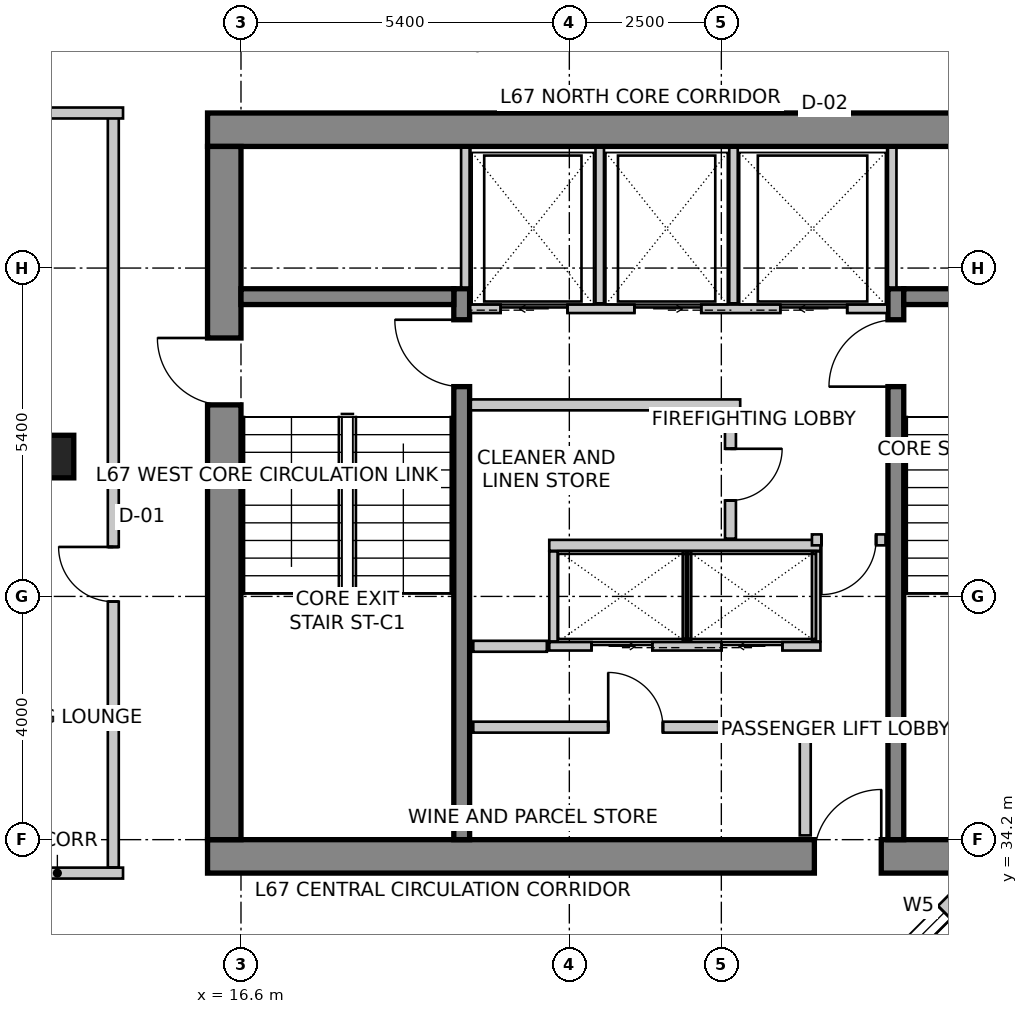
"""IFC4 building model, lengths in metres.
Left out: names, types, materials, properties, quantities, classifications, styles, units other than length and angle.
Written with IfcOpenShell. Run it as: python <this file> out.ifc"""

import sys

from ifc_helpers import new_model, si_unit, direction, frame, frame_2d, origin, origin_2d, place, context, subcontext, project, spatial, rectangle, extrude, source, transform, mapped, element, fill, save


model = new_model("IFC4")
c1 = context("Model", 3, precision=1e-05, world=origin(), true_north=direction((0.0, 1.0)))
c2 = subcontext(c1, "Body", "Model", "MODEL_VIEW")
j1 = project(units=[si_unit("LENGTHUNIT", "METRE"), si_unit("PLANEANGLEUNIT", "RADIAN")], contexts=[c1])
p1 = place(None, origin())
s1 = spatial("IfcSite", under=j1, at=p1, CompositionType="ELEMENT")
p2 = place(p1, origin())
s2 = spatial("IfcBuilding", under=s1, at=p2, CompositionType="ELEMENT")
p3 = place(p2, frame((0.0, 0.0, 263.7)))
s3 = spatial("IfcBuildingStorey", under=s2, at=p3, CompositionType="ELEMENT", Elevation=263.7)
p4 = place(p3, frame((16.05, 45.875, 0.0), z_axis=(0.0, 0.0, 1.0), x_axis=(1.0, 0.0, 0.0)))
e1 = element("IfcWall", 1, at=p4, inside=s3, PredefinedType="SHEAR", context=c2, shape_type="SweptSolid", body=[
    extrude(rectangle(XDim=15.5, YDim=0.55, at=frame_2d((7.75, 0.0))), origin(), (0.0, 0.0, 1.0), 3.6),
])
p5 = place(p3, frame((16.05, 33.925, 0.0), z_axis=(0.0, 0.0, 1.0), x_axis=(1.0, 0.0, 0.0)))
e2 = element("IfcWall", 2, at=p5, inside=s3, PredefinedType="SHEAR", context=c2, shape_type="SweptSolid", body=[
    extrude(rectangle(XDim=15.5, YDim=0.55, at=frame_2d((7.75, 0.0))), origin(), (0.0, 0.0, 1.0), 3.6),
])
m1 = source(origin(), c2, "Body", "SweptSolid", [
    extrude(rectangle(XDim=1.1, YDim=2.15, at=frame_2d((0.55, 1.075))), frame((0.0, 0.285, 0.0), z_axis=(0.0, -1.0, 0.0), x_axis=(1.0, 0.0, 0.0)), (0.0, 0.0, 1.0), 0.57),
])
p6 = place(p5, frame((9.98, 0.0, 0.0)))
e3 = element("IfcOpeningElement", 3, at=p6, cuts=e2, PredefinedType="OPENING", context=c2, shape_type="MappedRepresentation", body=[
    mapped(m1, transform((0.0, 0.0, 0.0), scale=1.0)),
])
p7 = place(p3, frame((16.325, 34.2, 0.0), z_axis=(0.0, 0.0, 1.0), x_axis=(0.0, 1.0, 0.0)))
e4 = element("IfcWall", 4, at=p7, inside=s3, PredefinedType="SHEAR", context=c2, shape_type="SweptSolid", body=[
    extrude(rectangle(XDim=11.4, YDim=0.55, at=frame_2d((5.7, 0.0))), origin(), (0.0, 0.0, 1.0), 3.6),
])
p8 = place(p7, frame((7.15, 0.0, 0.0)))
e5 = element("IfcOpeningElement", 5, at=p8, cuts=e4, PredefinedType="OPENING", context=c2, shape_type="MappedRepresentation", body=[
    mapped(m1, transform((0.0, 0.0, 0.0), scale=1.0)),
])
p9 = place(p3, frame((20.23, 34.2, 0.0), z_axis=(0.0, 0.0, 1.0), x_axis=(0.0, 1.0, 0.0)))
e6 = element("IfcWall", 6, at=p9, inside=s3, PredefinedType="SHEAR", context=c2, shape_type="SweptSolid", body=[
    extrude(rectangle(XDim=9.06, YDim=0.26, at=frame_2d((4.53, 0.0))), origin(), (0.0, 0.0, 1.0), 3.6),
])
m2 = source(origin(), c2, "Body", "SweptSolid", [
    extrude(rectangle(XDim=1.1, YDim=2.15, at=frame_2d((0.55, 1.075))), frame((0.0, 0.14, 0.0), z_axis=(0.0, -1.0, 0.0), x_axis=(1.0, 0.0, 0.0)), (0.0, 0.0, 1.0), 0.28),
])
p10 = place(p9, frame((7.45, 0.0, 0.0)))
e7 = element("IfcOpeningElement", 7, at=p10, cuts=e6, PredefinedType="OPENING", context=c2, shape_type="MappedRepresentation", body=[
    mapped(m2, transform((0.0, 0.0, 0.0), scale=1.0)),
])
p11 = place(p3, frame((27.37, 34.2, 0.0), z_axis=(0.0, 0.0, 1.0), x_axis=(0.0, 1.0, 0.0)))
e8 = element("IfcWall", 8, at=p11, inside=s3, PredefinedType="SHEAR", context=c2, shape_type="SweptSolid", body=[
    extrude(rectangle(XDim=9.06, YDim=0.26, at=frame_2d((4.53, 0.0))), origin(), (0.0, 0.0, 1.0), 3.6),
])
p12 = place(p11, frame((7.45, 0.0, 0.0)))
e9 = element("IfcOpeningElement", 9, at=p12, cuts=e8, PredefinedType="OPENING", context=c2, shape_type="MappedRepresentation", body=[
    mapped(m2, transform((0.0, 0.0, 0.0), scale=1.0)),
])
for number, where, z_axis, x_axis in (
    (10, (16.6, 43.13, 0.0), (0.0, 0.0, 1.0), (1.0, 0.0, 0.0)),
    (11, (27.5, 43.13, 0.0), (0.0, 0.0, 1.0), (1.0, 0.0, 0.0)),
):
    element("IfcWall", number, at=place(p3, frame(where, z_axis=z_axis, x_axis=x_axis)), inside=s3, PredefinedType="SHEAR", context=c2, shape_type="SweptSolid", body=[
        extrude(rectangle(XDim=3.5, YDim=0.26, at=frame_2d((1.75, 0.0))), origin(), (0.0, 0.0, 1.0), 3.6),
    ])
m3 = source(origin(), c2, "Body", "SweptSolid", [
    extrude(rectangle(XDim=0.7, YDim=0.7, at=origin_2d()), origin(), (0.0, 0.0, 1.0), 3.6),
])
p13 = place(p3, frame((13.5, 40.5, 0.0), z_axis=(0.0, 0.0, 1.0), x_axis=(1.0, 0.0, 0.0)))
e12 = element("IfcColumn", 12, at=p13, inside=s3, PredefinedType="COLUMN", context=c2, shape_type="MappedRepresentation", body=[
    mapped(m3, transform((0.0, 0.0, 0.0), scale=1.0)),
])
p14 = place(p3, frame((26.42, 31.256, 0.0), z_axis=(0.0, 0.0, 1.0), x_axis=(0.707106781187, 0.707106781187, 0.0)))
e13 = element("IfcWall", 13, at=p14, inside=s3, PredefinedType="SOLIDWALL", context=c2, shape_type="SweptSolid", body=[
    extrude(rectangle(XDim=2.907, YDim=0.3, at=frame_2d((1.454, 0.0))), origin(), (0.0, 0.0, 1.0), 3.35),
])
m4 = source(origin(), c2, "Body", "SweptSolid", [
    extrude(rectangle(XDim=1.2, YDim=1.6, at=frame_2d((0.6, 0.8))), frame((0.0, 0.16, 0.0), z_axis=(0.0, -1.0, 0.0), x_axis=(1.0, 0.0, 0.0)), (0.0, 0.0, 1.0), 0.32),
])
p15 = place(p14, frame((1.272, 0.0, 0.85)))
e14 = element("IfcOpeningElement", 14, at=p15, cuts=e13, PredefinedType="OPENING", context=c2, shape_type="MappedRepresentation", body=[
    mapped(m4, transform((0.0, 0.0, 0.0), scale=1.0)),
])
p16 = place(p3, frame((21.874, 52.742, 0.0), z_axis=(0.0, 0.0, 1.0), x_axis=(-0.84365659959, -0.536883173482, 0.0)))
e15 = element("IfcWall", 15, at=p16, inside=s3, PredefinedType="SOLIDWALL", context=c2, shape_type="SweptSolid", body=[
    extrude(rectangle(XDim=10.283, YDim=0.3, at=frame_2d((5.142, 0.0))), origin(), (0.0, 0.0, 1.0), 3.35),
])
m5 = source(origin(), c2, "Body", "SweptSolid", [
    extrude(rectangle(XDim=2.4, YDim=2.2, at=frame_2d((1.2, 1.1))), frame((0.0, 0.16, 0.0), z_axis=(0.0, -1.0, 0.0), x_axis=(1.0, 0.0, 0.0)), (0.0, 0.0, 1.0), 0.32),
])
p17 = place(p16, frame((1.26, 0.0, 0.85)))
e16 = element("IfcOpeningElement", 16, at=p17, cuts=e15, PredefinedType="OPENING", context=c2, shape_type="MappedRepresentation", body=[
    mapped(m5, transform((0.0, 0.0, 0.0), scale=1.0)),
])
m6 = source(origin(), c2, "Body", "SweptSolid", [
    extrude(rectangle(XDim=2.1, YDim=2.0, at=frame_2d((1.05, 1.0))), frame((0.0, 0.16, 0.0), z_axis=(0.0, -1.0, 0.0), x_axis=(1.0, 0.0, 0.0)), (0.0, 0.0, 1.0), 0.32),
])
p18 = place(p16, frame((5.69, 0.0, 0.85)))
e17 = element("IfcOpeningElement", 17, at=p18, cuts=e15, PredefinedType="OPENING", context=c2, shape_type="MappedRepresentation", body=[
    mapped(m6, transform((0.0, 0.0, 0.0), scale=1.0)),
])
p19 = place(p3, frame((20.37, 42.93, 0.0), z_axis=(0.0, 0.0, 1.0), x_axis=(1.0, 0.0, 0.0)))
e18 = element("IfcWall", 18, at=p19, inside=s3, PredefinedType="SOLIDWALL", context=c2, shape_type="SweptSolid", body=[
    extrude(rectangle(XDim=6.86, YDim=0.14, at=frame_2d((3.43, 0.0))), origin(), (0.0, 0.0, 1.0), 3.35),
])
m7 = source(origin(), c2, "Body", "SweptSolid", [
    extrude(rectangle(XDim=1.1, YDim=2.15, at=frame_2d((0.55, 1.075))), frame((0.0, 0.08, 0.0), z_axis=(0.0, -1.0, 0.0), x_axis=(1.0, 0.0, 0.0)), (0.0, 0.0, 1.0), 0.16),
])
p20 = place(p19, frame((0.5, 0.0, 0.0)))
e19 = element("IfcOpeningElement", 19, at=p20, cuts=e18, PredefinedType="OPENING", context=c2, shape_type="MappedRepresentation", body=[
    mapped(m7, transform((0.0, 0.0, 0.0), scale=1.0)),
])
p21 = place(p19, frame((2.7, 0.0, 0.0)))
e20 = element("IfcOpeningElement", 20, at=p21, cuts=e18, PredefinedType="OPENING", context=c2, shape_type="MappedRepresentation", body=[
    mapped(m7, transform((0.0, 0.0, 0.0), scale=1.0)),
])
p22 = place(p19, frame((5.1, 0.0, 0.0)))
e21 = element("IfcOpeningElement", 21, at=p22, cuts=e18, PredefinedType="OPENING", context=c2, shape_type="MappedRepresentation", body=[
    mapped(m7, transform((0.0, 0.0, 0.0), scale=1.0)),
])
for number, where, z_axis, x_axis in (
    (22, (20.29, 43.28, 0.0), (0.0, 0.0, 1.0), (0.0, 1.0, 0.0)),
    (23, (27.31, 43.28, 0.0), (0.0, 0.0, 1.0), (0.0, 1.0, 0.0)),
):
    element("IfcWall", number, at=place(p3, frame(where, z_axis=z_axis, x_axis=x_axis)), inside=s3, PredefinedType="SOLIDWALL", context=c2, shape_type="SweptSolid", body=[
        extrude(rectangle(XDim=2.3, YDim=0.14, at=frame_2d((1.15, 0.0))), origin(), (0.0, 0.0, 1.0), 3.35),
    ])
for number, where, z_axis, x_axis in (
    (24, (22.5, 43.02, 0.0), (0.0, 0.0, 1.0), (0.0, 1.0, 0.0)),
    (25, (24.7, 43.02, 0.0), (0.0, 0.0, 1.0), (0.0, 1.0, 0.0)),
):
    element("IfcWall", number, at=place(p3, frame(where, z_axis=z_axis, x_axis=x_axis)), inside=s3, PredefinedType="SOLIDWALL", context=c2, shape_type="SweptSolid", body=[
        extrude(rectangle(XDim=2.56, YDim=0.14, at=frame_2d((1.28, 0.0))), origin(), (0.0, 0.0, 1.0), 3.35),
    ])
p23 = place(p3, frame((21.67, 37.38, 0.0), z_axis=(0.0, 0.0, 1.0), x_axis=(1.0, 0.0, 0.0)))
e26 = element("IfcWall", 26, at=p23, inside=s3, PredefinedType="SOLIDWALL", context=c2, shape_type="SweptSolid", body=[
    extrude(rectangle(XDim=4.46, YDim=0.14, at=frame_2d((2.23, 0.0))), origin(), (0.0, 0.0, 1.0), 3.35),
])
m8 = source(origin(), c2, "Body", "SweptSolid", [
    extrude(rectangle(XDim=1.0, YDim=2.15, at=frame_2d((0.5, 1.075))), frame((0.0, 0.08, 0.0), z_axis=(0.0, -1.0, 0.0), x_axis=(1.0, 0.0, 0.0)), (0.0, 0.0, 1.0), 0.16),
])
p24 = place(p23, frame((0.695, 0.0, 0.0)))
e27 = element("IfcOpeningElement", 27, at=p24, cuts=e26, PredefinedType="OPENING", context=c2, shape_type="MappedRepresentation", body=[
    mapped(m8, transform((0.0, 0.0, 0.0), scale=1.0)),
])
p25 = place(p23, frame((2.835, 0.0, 0.0)))
e28 = element("IfcOpeningElement", 28, at=p25, cuts=e26, PredefinedType="OPENING", context=c2, shape_type="MappedRepresentation", body=[
    mapped(m8, transform((0.0, 0.0, 0.0), scale=1.0)),
])
p26 = place(p3, frame((21.67, 39.04, 0.0), z_axis=(0.0, 0.0, 1.0), x_axis=(1.0, 0.0, 0.0)))
e29 = element("IfcWall", 29, at=p26, inside=s3, PredefinedType="SOLIDWALL", context=c2, shape_type="SweptSolid", body=[
    extrude(rectangle(XDim=4.46, YDim=0.18, at=frame_2d((2.23, 0.0))), origin(), (0.0, 0.0, 1.0), 3.35),
])
for number, where, z_axis, x_axis in (
    (30, (26.06, 37.46, 0.0), (0.0, 0.0, 1.0), (0.0, 1.0, 0.0)),
    (31, (21.74, 37.46, 0.0), (0.0, 0.0, 1.0), (0.0, 1.0, 0.0)),
    (32, (23.935, 37.46, 0.0), (0.0, 0.0, 1.0), (0.0, 1.0, 0.0)),
):
    element("IfcWall", number, at=place(p3, frame(where, z_axis=z_axis, x_axis=x_axis)), inside=s3, PredefinedType="SOLIDWALL", context=c2, shape_type="SweptSolid", body=[
        extrude(rectangle(XDim=1.48, YDim=0.14, at=frame_2d((0.74, 0.0))), origin(), (0.0, 0.0, 1.0), 3.35),
    ])
p27 = place(p3, frame((24.81, 41.35, 0.0), z_axis=(0.0, 0.0, 1.0), x_axis=(-1.0, 0.0, 0.0)))
e33 = element("IfcWall", 33, at=p27, inside=s3, PredefinedType="PARTITIONING", context=c2, shape_type="SweptSolid", body=[
    extrude(rectangle(XDim=4.43, YDim=0.18, at=frame_2d((2.215, 0.0))), origin(), (0.0, 0.0, 1.0), 3.35),
])
p28 = place(p3, frame((24.65, 41.256, 0.0), z_axis=(0.0, 0.0, 1.0), x_axis=(0.0, -1.0, 0.0)))
e34 = element("IfcWall", 34, at=p28, inside=s3, PredefinedType="PARTITIONING", context=c2, shape_type="SweptSolid", body=[
    extrude(rectangle(XDim=2.106, YDim=0.18, at=frame_2d((1.053, 0.0))), origin(), (0.0, 0.0, 1.0), 3.35),
])
m9 = source(origin(), c2, "Body", "SweptSolid", [
    extrude(rectangle(XDim=0.85, YDim=2.15, at=frame_2d((0.425, 1.075))), frame((0.0, 0.1, 0.0), z_axis=(0.0, -1.0, 0.0), x_axis=(1.0, 0.0, 0.0)), (0.0, 0.0, 1.0), 0.2),
])
p29 = place(p28, frame((0.628, 0.0, 0.0)))
e35 = element("IfcOpeningElement", 35, at=p29, cuts=e34, PredefinedType="OPENING", context=c2, shape_type="MappedRepresentation", body=[
    mapped(m9, transform((0.0, 0.0, 0.0), scale=1.0)),
])
p30 = place(p3, frame((21.63, 37.38, 0.0), z_axis=(0.0, 0.0, 1.0), x_axis=(-1.0, 0.0, 0.0)))
e36 = element("IfcWall", 36, at=p30, inside=s3, PredefinedType="PARTITIONING", context=c2, shape_type="SweptSolid", body=[
    extrude(rectangle(XDim=1.21, YDim=0.18, at=frame_2d((0.605, 0.0))), origin(), (0.0, 0.0, 1.0), 3.35),
])
p31 = place(p3, frame((27.2, 39.13, 0.0), z_axis=(0.0, 0.0, 1.0), x_axis=(-1.0, 0.0, 0.0)))
e37 = element("IfcWall", 37, at=p31, inside=s3, PredefinedType="PARTITIONING", context=c2, shape_type="SweptSolid", body=[
    extrude(rectangle(XDim=1.21, YDim=0.18, at=frame_2d((0.605, 0.0))), origin(), (0.0, 0.0, 1.0), 3.35),
])
m10 = source(origin(), c2, "Body", "SweptSolid", [
    extrude(rectangle(XDim=0.9, YDim=2.15, at=frame_2d((0.45, 1.075))), frame((0.0, 0.1, 0.0), z_axis=(0.0, -1.0, 0.0), x_axis=(1.0, 0.0, 0.0)), (0.0, 0.0, 1.0), 0.2),
])
p32 = place(p31, frame((0.155, 0.0, 0.0)))
e38 = element("IfcOpeningElement", 38, at=p32, cuts=e37, PredefinedType="OPENING", context=c2, shape_type="MappedRepresentation", body=[
    mapped(m10, transform((0.0, 0.0, 0.0), scale=1.0)),
])
p33 = place(p3, frame((20.42, 36.05, 0.0), z_axis=(0.0, 0.0, 1.0), x_axis=(1.0, 0.0, 0.0)))
e39 = element("IfcWall", 39, at=p33, inside=s3, PredefinedType="PARTITIONING", context=c2, shape_type="SweptSolid", body=[
    extrude(rectangle(XDim=5.46, YDim=0.18, at=frame_2d((2.73, 0.0))), origin(), (0.0, 0.0, 1.0), 3.35),
])
p34 = place(p33, frame((2.219, 0.0, 0.0)))
e40 = element("IfcOpeningElement", 40, at=p34, cuts=e39, PredefinedType="OPENING", context=c2, shape_type="MappedRepresentation", body=[
    mapped(m10, transform((0.0, 0.0, 0.0), scale=1.0)),
])
p35 = place(p3, frame((25.88, 35.956, 0.0), z_axis=(0.0, 0.0, 1.0), x_axis=(0.0, -1.0, 0.0)))
e41 = element("IfcWall", 41, at=p35, inside=s3, PredefinedType="PARTITIONING", context=c2, shape_type="SweptSolid", body=[
    extrude(rectangle(XDim=1.686, YDim=0.18, at=frame_2d((0.843, 0.0))), origin(), (0.0, 0.0, 1.0), 2.642),
])
p36 = place(p3, frame((12.5, 33.65, 0.0), z_axis=(0.0, 0.0, 1.0), x_axis=(1.0, 0.0, 0.0)))
e42 = element("IfcWall", 42, at=p36, inside=s3, PredefinedType="PARTITIONING", context=c2, shape_type="SweptSolid", body=[
    extrude(rectangle(XDim=2.16, YDim=0.18, at=frame_2d((1.08, 0.0))), origin(), (0.0, 0.0, 1.0), 3.35),
])
p37 = place(p3, frame((14.5, 33.744, 0.0), z_axis=(0.0, 0.0, 1.0), x_axis=(0.0, 1.0, 0.0)))
e43 = element("IfcWall", 43, at=p37, inside=s3, PredefinedType="PARTITIONING", context=c2, shape_type="SweptSolid", body=[
    extrude(rectangle(XDim=12.406, YDim=0.18, at=frame_2d((6.203, 0.0))), origin(), (0.0, 0.0, 1.0), 3.35),
])
p38 = place(p37, frame((4.37, 0.0, 0.0)))
e44 = element("IfcOpeningElement", 44, at=p38, cuts=e43, PredefinedType="OPENING", context=c2, shape_type="MappedRepresentation", body=[
    mapped(m10, transform((0.0, 0.0, 0.0), scale=1.0)),
])
p39 = place(p3, frame((14.66, 46.15, 0.0), z_axis=(0.0, 0.0, 1.0), x_axis=(-1.0, 0.0, 0.0)))
e45 = element("IfcWall", 45, at=p39, inside=s3, PredefinedType="PARTITIONING", context=c2, shape_type="SweptSolid", body=[
    extrude(rectangle(XDim=1.602, YDim=0.18, at=frame_2d((0.801, 0.0))), origin(), (0.0, 0.0, 1.0), 3.35),
])
m11 = source(origin(), c2, "Body", "SweptSolid", [
    extrude(rectangle(XDim=1.2, YDim=1.6, at=frame_2d((0.6, 0.8))), frame((0.0, -0.015, 0.0), z_axis=(0.0, -1.0, 0.0), x_axis=(1.0, 0.0, 0.0)), (0.0, 0.0, 1.0), 0.06),
])
p40 = place(p15, origin())
e46 = element("IfcWindow", 46, at=p40, inside=s3, PartitioningType="SINGLE_PANEL", PredefinedType="WINDOW", context=c2, shape_type="MappedRepresentation", body=[
    mapped(m11, transform((0.0, 0.0, 0.0), scale=1.0)),
])
fill(e14, e46)
m12 = source(origin(), c2, "Body", "SweptSolid", [
    extrude(rectangle(XDim=1.1, YDim=2.15, at=frame_2d((0.55, 1.075))), frame((0.0, 0.025, 0.0), z_axis=(0.0, -1.0, 0.0), x_axis=(1.0, 0.0, 0.0)), (0.0, 0.0, 1.0), 0.05),
])
p41 = place(p20, origin())
e47 = element("IfcDoor", 47, at=p41, inside=s3, OperationType="SLIDING_TO_LEFT", PredefinedType="DOOR", context=c2, shape_type="MappedRepresentation", body=[
    mapped(m12, transform((0.0, 0.0, 0.0), scale=1.0)),
])
fill(e19, e47)
p42 = place(p21, origin())
e48 = element("IfcDoor", 48, at=p42, inside=s3, OperationType="SLIDING_TO_RIGHT", PredefinedType="DOOR", context=c2, shape_type="MappedRepresentation", body=[
    mapped(m12, transform((0.0, 0.0, 0.0), scale=1.0)),
])
fill(e20, e48)
m13 = source(origin(), c2, "Body", "SweptSolid", [
    extrude(rectangle(XDim=1.1, YDim=2.15, at=frame_2d((0.55, 1.075))), frame((0.0, 0.025, 0.0), z_axis=(0.0, -1.0, 0.0), x_axis=(1.0, 0.0, 0.0)), (0.0, 0.0, 1.0), 0.05),
])
p43 = place(p22, origin())
e49 = element("IfcDoor", 49, at=p43, inside=s3, OperationType="SLIDING_TO_LEFT", PredefinedType="DOOR", context=c2, shape_type="MappedRepresentation", body=[
    mapped(m13, transform((0.0, 0.0, 0.0), scale=1.0)),
])
fill(e21, e49)
m14 = source(origin(), c2, "Body", "SweptSolid", [
    extrude(rectangle(XDim=1.0, YDim=2.15, at=frame_2d((0.5, 1.075))), frame((0.0, 0.025, 0.0), z_axis=(0.0, -1.0, 0.0), x_axis=(1.0, 0.0, 0.0)), (0.0, 0.0, 1.0), 0.05),
])
p44 = place(p24, origin())
e50 = element("IfcDoor", 50, at=p44, inside=s3, OperationType="SLIDING_TO_RIGHT", PredefinedType="DOOR", context=c2, shape_type="MappedRepresentation", body=[
    mapped(m14, transform((0.0, 0.0, 0.0), scale=1.0)),
])
fill(e27, e50)
p45 = place(p25, origin())
e51 = element("IfcDoor", 51, at=p45, inside=s3, OperationType="SLIDING_TO_LEFT", PredefinedType="DOOR", context=c2, shape_type="MappedRepresentation", body=[
    mapped(m14, transform((0.0, 0.0, 0.0), scale=1.0)),
])
fill(e28, e51)
m15 = source(origin(), c2, "Body", "SweptSolid", [
    extrude(rectangle(XDim=1.1, YDim=2.15, at=frame_2d((0.55, 1.075))), frame((0.0, 0.025, 0.0), z_axis=(0.0, -1.0, 0.0), x_axis=(1.0, 0.0, 0.0)), (0.0, 0.0, 1.0), 0.05),
])
p46 = place(p10, origin())
e52 = element("IfcDoor", 52, at=p46, inside=s3, OperationType="SINGLE_SWING_RIGHT", PredefinedType="DOOR", context=c2, shape_type="MappedRepresentation", body=[
    mapped(m15, transform((0.0, 0.0, 0.0), scale=1.0)),
])
fill(e7, e52)
p47 = place(p12, origin())
e53 = element("IfcDoor", 53, at=p47, inside=s3, OperationType="SINGLE_SWING_LEFT", PredefinedType="DOOR", context=c2, shape_type="MappedRepresentation", body=[
    mapped(m15, transform((0.0, 0.0, 0.0), scale=1.0)),
])
fill(e9, e53)
p48 = place(p8, origin())
e54 = element("IfcDoor", 54, at=p48, inside=s3, OperationType="SINGLE_SWING_RIGHT", PredefinedType="DOOR", context=c2, shape_type="MappedRepresentation", body=[
    mapped(m15, transform((0.0, 0.0, 0.0), scale=1.0)),
])
fill(e5, e54)
p49 = place(p6, origin())
e55 = element("IfcDoor", 55, at=p49, inside=s3, OperationType="SINGLE_SWING_RIGHT", PredefinedType="DOOR", context=c2, shape_type="MappedRepresentation", body=[
    mapped(m15, transform((0.0, 0.0, 0.0), scale=1.0)),
])
fill(e3, e55)
m16 = source(origin(), c2, "Body", "SweptSolid", [
    extrude(rectangle(XDim=0.85, YDim=2.15, at=frame_2d((0.425, 1.075))), frame((0.0, 0.025, 0.0), z_axis=(0.0, -1.0, 0.0), x_axis=(1.0, 0.0, 0.0)), (0.0, 0.0, 1.0), 0.05),
])
p50 = place(p29, origin())
e56 = element("IfcDoor", 56, at=p50, inside=s3, OperationType="SINGLE_SWING_LEFT", PredefinedType="DOOR", context=c2, shape_type="MappedRepresentation", body=[
    mapped(m16, transform((0.0, 0.0, 0.0), scale=1.0)),
])
fill(e35, e56)
m17 = source(origin(), c2, "Body", "SweptSolid", [
    extrude(rectangle(XDim=0.9, YDim=2.15, at=frame_2d((0.45, 1.075))), frame((0.0, 0.025, 0.0), z_axis=(0.0, -1.0, 0.0), x_axis=(1.0, 0.0, 0.0)), (0.0, 0.0, 1.0), 0.05),
])
p51 = place(p32, origin())
e57 = element("IfcDoor", 57, at=p51, inside=s3, OperationType="SINGLE_SWING_RIGHT", PredefinedType="DOOR", context=c2, shape_type="MappedRepresentation", body=[
    mapped(m17, transform((0.0, 0.0, 0.0), scale=1.0)),
])
fill(e38, e57)
p52 = place(p34, origin())
e58 = element("IfcDoor", 58, at=p52, inside=s3, OperationType="SINGLE_SWING_LEFT", PredefinedType="DOOR", context=c2, shape_type="MappedRepresentation", body=[
    mapped(m17, transform((0.0, 0.0, 0.0), scale=1.0)),
])
fill(e40, e58)
m18 = source(origin(), c2, "Body", "SweptSolid", [
    extrude(rectangle(XDim=0.9, YDim=2.15, at=frame_2d((0.45, 1.075))), frame((0.0, 0.025, 0.0), z_axis=(0.0, -1.0, 0.0), x_axis=(1.0, 0.0, 0.0)), (0.0, 0.0, 1.0), 0.05),
])
p53 = place(p38, origin())
e59 = element("IfcDoor", 59, at=p53, inside=s3, OperationType="SINGLE_SWING_RIGHT", PredefinedType="DOOR", context=c2, shape_type="MappedRepresentation", body=[
    mapped(m18, transform((0.0, 0.0, 0.0), scale=1.0)),
])
fill(e44, e59)
save(model, sys.argv[1])
